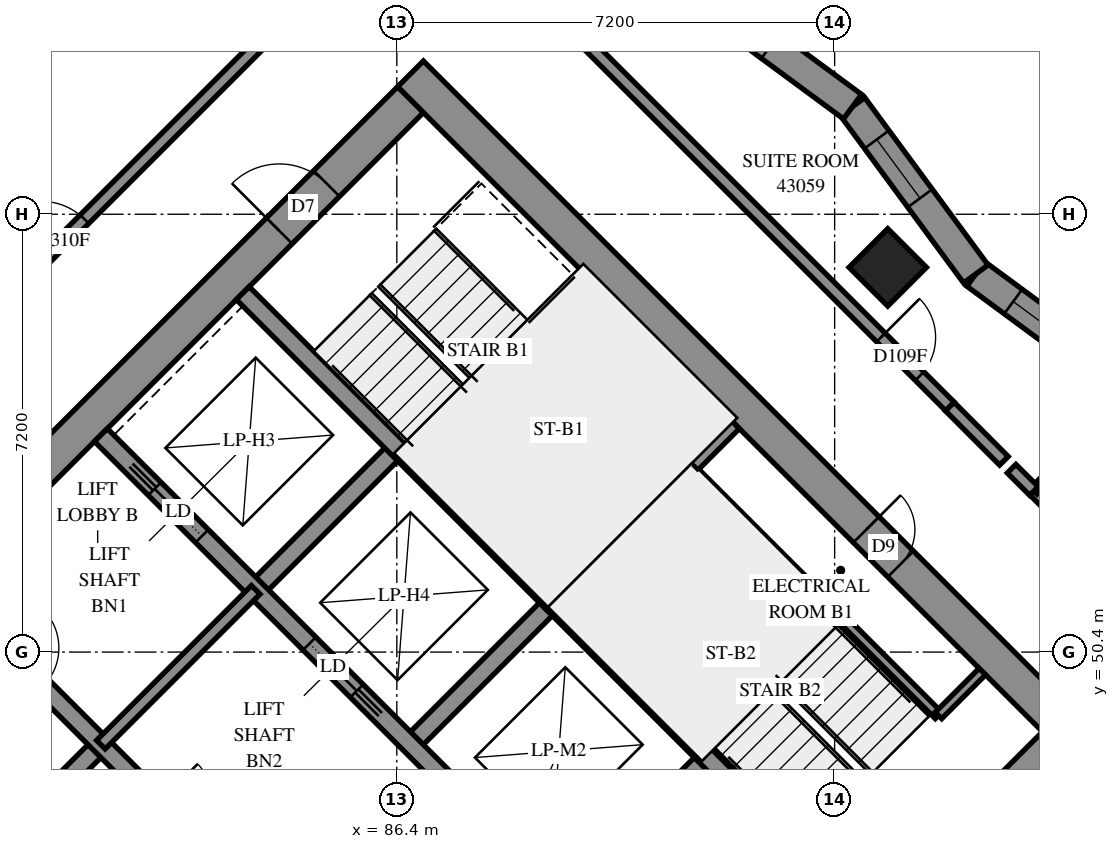
"""IFC4 building model, lengths in metres.
Left out: names, types, materials, properties, quantities, classifications, styles, units other than length and angle.
Written with IfcOpenShell. Run it as: python <this file> out.ifc"""

import sys

from ifc_helpers import new_model, si_unit, direction, frame, frame_2d, origin, origin_2d, place, context, subcontext, project, spatial, polyline, rectangle, outline, extrude, element, fill, save


model = new_model("IFC4")
c1 = context("Model", 3, precision=1e-05, world=origin(), true_north=direction((0.0, 1.0)))
c2 = subcontext(c1, "Body", "Model", "MODEL_VIEW")
j1 = project(units=[si_unit("LENGTHUNIT", "METRE"), si_unit("PLANEANGLEUNIT", "RADIAN")], contexts=[c1])
p1 = place(None, origin())
s1 = spatial("IfcSite", under=j1, at=p1, CompositionType="ELEMENT")
p2 = place(p1, origin())
s2 = spatial("IfcBuilding", under=s1, at=p2, CompositionType="ELEMENT")
p3 = place(p2, frame((0.0, 0.0, 159.2)))
s3 = spatial("IfcBuildingStorey", under=s2, at=p3, CompositionType="ELEMENT", Elevation=159.2)
p4 = place(p3, frame((94.474, 56.727, 0.0), z_axis=(0.0, 0.0, 1.0), x_axis=(0.7071067812, -0.7071067812, 0.0)))
e1 = element("IfcColumn", 1, at=p4, inside=s3, PredefinedType="COLUMN", context=c2, shape_type="SweptSolid", body=[
    extrude(rectangle(XDim=0.9, YDim=0.9, at=origin_2d()), origin(), (0.0, 0.0, 1.0), 3.1),
])
p5 = place(p3, frame((76.018, 49.302, -0.3), z_axis=(0.0, 0.0, 1.0), x_axis=(0.7071067812, -0.7071067812, 0.0)))
e2 = element("IfcWall", 2, at=p5, inside=s3, PredefinedType="SHEAR", context=c2, shape_type="SweptSolid", body=[
    extrude(rectangle(XDim=15.6, YDim=0.6, at=frame_2d((7.8, 0.0))), origin(), (0.0, 0.0, 1.0), 2.7),
])
p6 = place(p3, frame((86.625, 59.908, -0.3), z_axis=(0.0, 0.0, 1.0), x_axis=(0.7071067812, -0.7071067812, 0.0)))
e3 = element("IfcWall", 3, at=p6, inside=s3, PredefinedType="SHEAR", context=c2, shape_type="SweptSolid", body=[
    extrude(rectangle(XDim=15.6, YDim=0.6, at=frame_2d((7.8, 0.0))), origin(), (0.0, 0.0, 1.0), 2.7),
])
p7 = place(p6, frame((10.6, 0.0, 0.3)))
e4 = element("IfcOpeningElement", 4, at=p7, cuts=e3, PredefinedType="OPENING", context=c2, shape_type="SweptSolid", body=[
    extrude(rectangle(XDim=0.8, YDim=2.1, at=frame_2d((0.4, 1.05))), frame((0.0, 0.31, 0.0), z_axis=(0.0, -1.0, 0.0), x_axis=(1.0, 0.0, 0.0)), (0.0, 0.0, 1.0), 0.62),
])
p8 = place(p3, frame((76.442, 49.302, -0.3), z_axis=(0.0, 0.0, 1.0), x_axis=(0.7071067812, 0.7071067812, 0.0)))
e5 = element("IfcWall", 5, at=p8, inside=s3, PredefinedType="SHEAR", context=c2, shape_type="SweptSolid", body=[
    extrude(rectangle(XDim=14.4, YDim=0.6, at=frame_2d((7.2, 0.0))), origin(), (0.0, 0.0, 1.0), 2.7),
])
p9 = place(p8, frame((4.55, 0.0, 0.3)))
e6 = element("IfcOpeningElement", 6, at=p9, cuts=e5, PredefinedType="OPENING", context=c2, shape_type="SweptSolid", body=[
    extrude(rectangle(XDim=1.1, YDim=2.1, at=frame_2d((0.55, 1.05))), frame((0.0, 0.31, 0.0), z_axis=(0.0, -1.0, 0.0), x_axis=(1.0, 0.0, 0.0)), (0.0, 0.0, 1.0), 0.62),
])
p10 = place(p8, frame((11.35, 0.0, 0.3)))
e7 = element("IfcOpeningElement", 7, at=p10, cuts=e5, PredefinedType="OPENING", context=c2, shape_type="SweptSolid", body=[
    extrude(rectangle(XDim=1.1, YDim=2.1, at=frame_2d((0.55, 1.05))), frame((0.0, 0.31, 0.0), z_axis=(0.0, -1.0, 0.0), x_axis=(1.0, 0.0, 0.0)), (0.0, 0.0, 1.0), 0.62),
])
p11 = place(p3, frame((87.049, 38.695, -0.3), z_axis=(0.0, 0.0, 1.0), x_axis=(0.7071067812, 0.7071067812, 0.0)))
e8 = element("IfcWall", 8, at=p11, inside=s3, PredefinedType="SHEAR", context=c2, shape_type="SweptSolid", body=[
    extrude(rectangle(XDim=14.4, YDim=0.6, at=frame_2d((7.2, 0.0))), origin(), (0.0, 0.0, 1.0), 2.7),
])
p12 = place(p11, frame((4.55, 0.0, 0.3)))
e9 = element("IfcOpeningElement", 9, at=p12, cuts=e8, PredefinedType="OPENING", context=c2, shape_type="SweptSolid", body=[
    extrude(rectangle(XDim=1.1, YDim=2.1, at=frame_2d((0.55, 1.05))), frame((0.0, 0.31, 0.0), z_axis=(0.0, -1.0, 0.0), x_axis=(1.0, 0.0, 0.0)), (0.0, 0.0, 1.0), 0.62),
])
p13 = place(p11, frame((11.35, 0.0, 0.3)))
e10 = element("IfcOpeningElement", 10, at=p13, cuts=e8, PredefinedType="OPENING", context=c2, shape_type="SweptSolid", body=[
    extrude(rectangle(XDim=1.1, YDim=2.1, at=frame_2d((0.55, 1.05))), frame((0.0, 0.31, 0.0), z_axis=(0.0, -1.0, 0.0), x_axis=(1.0, 0.0, 0.0)), (0.0, 0.0, 1.0), 0.62),
])
for number, where, z_axis, x_axis in (
    (11, (79.2, 46.544, 0.0), (0.0, 0.0, 1.0), (0.707, 0.707, 0.0)),
    (12, (84.079, 51.423, 0.0), (0.0, 0.0, 1.0), (0.707, 0.707, 0.0)),
):
    element("IfcWall", number, at=place(p3, frame(where, z_axis=z_axis, x_axis=x_axis)), inside=s3, PredefinedType="SOLIDWALL", context=c2, shape_type="SweptSolid", body=[
        extrude(rectangle(XDim=3.3, YDim=0.3, at=frame_2d((1.65, 0.0))), origin(), (0.0, 0.0, 1.0), 3.1),
    ])
for number, where, z_axis, x_axis in (
    (13, (86.625, 48.878, 0.0), (0.0, 0.0, 1.0), (0.707, 0.707, 0.0)),
    (14, (89.17, 46.332, 0.0), (0.0, 0.0, 1.0), (0.707, 0.707, 0.0)),
):
    element("IfcWall", number, at=place(p3, frame(where, z_axis=z_axis, x_axis=x_axis)), inside=s3, PredefinedType="SOLIDWALL", context=c2, shape_type="SweptSolid", body=[
        extrude(rectangle(XDim=3.3, YDim=0.3, at=frame_2d((1.65, 0.0))), origin(), (0.0, 0.0, 1.0), 3.1),
    ])
p14 = place(p3, frame((78.988, 51.423, 0.0), z_axis=(0.0, 0.0, 1.0), x_axis=(0.7071067812, -0.7071067812, 0.0)))
e15 = element("IfcWall", 15, at=p14, inside=s3, PredefinedType="SOLIDWALL", context=c2, shape_type="SweptSolid", body=[
    extrude(rectangle(XDim=14.4, YDim=0.3, at=frame_2d((7.2, 0.0))), origin(), (0.0, 0.0, 1.0), 3.1),
])
p15 = place(p14, frame((1.35, 0.0, 0.0)))
e16 = element("IfcOpeningElement", 16, at=p15, cuts=e15, PredefinedType="OPENING", context=c2, shape_type="SweptSolid", body=[
    extrude(rectangle(XDim=0.9, YDim=2.1, at=frame_2d((0.45, 1.05))), frame((0.0, 0.16, 0.0), z_axis=(0.0, -1.0, 0.0), x_axis=(1.0, 0.0, 0.0)), (0.0, 0.0, 1.0), 0.32),
])
p16 = place(p14, frame((4.95, 0.0, 0.0)))
e17 = element("IfcOpeningElement", 17, at=p16, cuts=e15, PredefinedType="OPENING", context=c2, shape_type="SweptSolid", body=[
    extrude(rectangle(XDim=0.9, YDim=2.1, at=frame_2d((0.45, 1.05))), frame((0.0, 0.16, 0.0), z_axis=(0.0, -1.0, 0.0), x_axis=(1.0, 0.0, 0.0)), (0.0, 0.0, 1.0), 0.32),
])
p17 = place(p14, frame((8.55, 0.0, 0.0)))
e18 = element("IfcOpeningElement", 18, at=p17, cuts=e15, PredefinedType="OPENING", context=c2, shape_type="SweptSolid", body=[
    extrude(rectangle(XDim=0.9, YDim=2.1, at=frame_2d((0.45, 1.05))), frame((0.0, 0.16, 0.0), z_axis=(0.0, -1.0, 0.0), x_axis=(1.0, 0.0, 0.0)), (0.0, 0.0, 1.0), 0.32),
])
p18 = place(p14, frame((12.05, 0.0, 0.0)))
e19 = element("IfcOpeningElement", 19, at=p18, cuts=e15, PredefinedType="OPENING", context=c2, shape_type="SweptSolid", body=[
    extrude(rectangle(XDim=1.1, YDim=2.1, at=frame_2d((0.55, 1.05))), frame((0.0, 0.16, 0.0), z_axis=(0.0, -1.0, 0.0), x_axis=(1.0, 0.0, 0.0)), (0.0, 0.0, 1.0), 0.32),
])
p19 = place(p3, frame((81.534, 53.969, 0.0), z_axis=(0.0, 0.0, 1.0), x_axis=(0.707103309, -0.7071102534, 0.0)))
e20 = element("IfcWall", 20, at=p19, inside=s3, PredefinedType="SOLIDWALL", context=c2, shape_type="SweptSolid", body=[
    extrude(rectangle(XDim=14.4, YDim=0.3, at=frame_2d((7.2, 0.0))), origin(), (0.0, 0.0, 1.0), 3.1),
])
p20 = place(p19, frame((1.25, 0.0, 0.0)))
e21 = element("IfcOpeningElement", 21, at=p20, cuts=e20, PredefinedType="OPENING", context=c2, shape_type="SweptSolid", body=[
    extrude(rectangle(XDim=1.1, YDim=2.1, at=frame_2d((0.55, 1.05))), frame((0.0, 0.16, 0.0), z_axis=(0.0, -1.0, 0.0), x_axis=(1.0, 0.0, 0.0)), (0.0, 0.0, 1.0), 0.32),
])
p21 = place(p19, frame((4.85, 0.0, 0.0)))
e22 = element("IfcOpeningElement", 22, at=p21, cuts=e20, PredefinedType="OPENING", context=c2, shape_type="SweptSolid", body=[
    extrude(rectangle(XDim=1.1, YDim=2.1, at=frame_2d((0.55, 1.05))), frame((0.0, 0.16, 0.0), z_axis=(0.0, -1.0, 0.0), x_axis=(1.0, 0.0, 0.0)), (0.0, 0.0, 1.0), 0.32),
])
p22 = place(p19, frame((8.45, 0.0, 0.0)))
e23 = element("IfcOpeningElement", 23, at=p22, cuts=e20, PredefinedType="OPENING", context=c2, shape_type="SweptSolid", body=[
    extrude(rectangle(XDim=1.1, YDim=2.1, at=frame_2d((0.55, 1.05))), frame((0.0, 0.16, 0.0), z_axis=(0.0, -1.0, 0.0), x_axis=(1.0, 0.0, 0.0)), (0.0, 0.0, 1.0), 0.32),
])
p23 = place(p19, frame((12.05, 0.0, 0.0)))
e24 = element("IfcOpeningElement", 24, at=p23, cuts=e20, PredefinedType="OPENING", context=c2, shape_type="SweptSolid", body=[
    extrude(rectangle(XDim=1.1, YDim=2.1, at=frame_2d((0.55, 1.05))), frame((0.0, 0.16, 0.0), z_axis=(0.0, -1.0, 0.0), x_axis=(1.0, 0.0, 0.0)), (0.0, 0.0, 1.0), 0.32),
])
for number, where, z_axis, x_axis in (
    (25, (83.867, 56.302, 0.0), (0.0, 0.0, 1.0), (0.707, -0.707, 0.0)),
    (26, (88.958, 51.211, 0.0), (0.0, 0.0, 1.0), (0.707, -0.707, 0.0)),
):
    element("IfcWall", number, at=place(p3, frame(where, z_axis=z_axis, x_axis=x_axis)), inside=s3, PredefinedType="SOLIDWALL", context=c2, shape_type="SweptSolid", body=[
        extrude(rectangle(XDim=7.2, YDim=0.3, at=frame_2d((3.6, 0.0))), origin(), (0.0, 0.0, 1.0), 3.1),
    ])
p24 = place(p3, frame((88.958, 51.211, 0.0), z_axis=(0.0, 0.0, 1.0), x_axis=(0.7071067812, 0.7071067812, 0.0)))
e27 = element("IfcWall", 27, at=p24, inside=s3, PredefinedType="SOLIDWALL", context=c2, shape_type="SweptSolid", body=[
    extrude(rectangle(XDim=4.2, YDim=0.3, at=frame_2d((2.1, 0.0))), origin(), (0.0, 0.0, 1.0), 3.1),
])
p25 = place(p3, frame((98.674, 54.59, 0.0), z_axis=(0.0, 0.0, 1.0), x_axis=(-0.8050440725, 0.5932150043, 0.0)))
e28 = element("IfcWall", 28, at=p25, inside=s3, PredefinedType="SOLIDWALL", context=c2, shape_type="SweptSolid", body=[
    extrude(outline(polyline([(-0.038, -0.25), (3.381, -0.25), (3.456, 0.25), (0.038, 0.25), (-0.038, -0.25)])), origin(), (0.0, 0.0, 1.0), 3.1),
])
p26 = place(p25, frame((1.455, 0.0, 0.45)))
e29 = element("IfcOpeningElement", 29, at=p26, cuts=e28, PredefinedType="OPENING", context=c2, shape_type="SweptSolid", body=[
    extrude(rectangle(XDim=1.2, YDim=2.5, at=frame_2d((0.6, 1.25))), frame((0.0, 0.26, 0.0), z_axis=(0.0, -1.0, 0.0), x_axis=(1.0, 0.0, 0.0)), (0.0, 0.0, 1.0), 0.52),
])
p27 = place(p3, frame((95.922, 56.618, 0.0), z_axis=(0.0, 0.0, 1.0), x_axis=(-0.5932150043, 0.8050440725, 0.0)))
e30 = element("IfcWall", 30, at=p27, inside=s3, PredefinedType="SOLIDWALL", context=c2, shape_type="SweptSolid", body=[
    extrude(outline(polyline([(0.038, -0.25), (3.456, -0.25), (3.381, 0.25), (-0.038, 0.25), (0.038, -0.25)])), origin(), (0.0, 0.0, 1.0), 3.1),
])
p28 = place(p27, frame((1.547, 0.0, 0.45)))
e31 = element("IfcOpeningElement", 31, at=p28, cuts=e30, PredefinedType="OPENING", context=c2, shape_type="SweptSolid", body=[
    extrude(rectangle(XDim=1.2, YDim=2.5, at=frame_2d((0.6, 1.25))), frame((0.0, 0.26, 0.0), z_axis=(0.0, -1.0, 0.0), x_axis=(1.0, 0.0, 0.0)), (0.0, 0.0, 1.0), 0.52),
])
p29 = place(p3, frame((93.894, 59.37, 0.0), z_axis=(0.0, 0.0, 1.0), x_axis=(-0.8050403966, 0.5932199928, 0.0)))
e32 = element("IfcWall", 32, at=p29, inside=s3, PredefinedType="SOLIDWALL", context=c2, shape_type="SweptSolid", body=[
    extrude(outline(polyline([(-0.038, -0.25), (3.381, -0.25), (3.456, 0.25), (0.038, 0.25), (-0.038, -0.25)])), origin(), (0.0, 0.0, 1.0), 3.1),
])
p30 = place(p29, frame((1.677, 0.0, 0.45)))
e33 = element("IfcOpeningElement", 33, at=p30, cuts=e32, PredefinedType="OPENING", context=c2, shape_type="SweptSolid", body=[
    extrude(rectangle(XDim=1.2, YDim=2.5, at=frame_2d((0.6, 1.25))), frame((0.0, 0.26, 0.0), z_axis=(0.0, -1.0, 0.0), x_axis=(1.0, 0.0, 0.0)), (0.0, 0.0, 1.0), 0.52),
])
p31 = place(p3, frame((91.313, 53.354, 0.0), z_axis=(0.0, 0.0, 1.0), x_axis=(0.7071067812, -0.7071067812, 0.0)))
e34 = element("IfcWall", 34, at=p31, inside=s3, PredefinedType="PARTITIONING", context=c2, shape_type="SweptSolid", body=[
    extrude(rectangle(XDim=5.65, YDim=0.15, at=frame_2d((2.825, 0.0))), origin(), (0.0, 0.0, 1.0), 3.1),
])
p32 = place(p3, frame((95.308, 49.358, 0.0), z_axis=(0.0, 0.0, 1.0), x_axis=(0.70705776, 0.707155799, 0.0)))
e35 = element("IfcWall", 35, at=p32, inside=s3, PredefinedType="PARTITIONING", context=c2, shape_type="SweptSolid", body=[
    extrude(rectangle(XDim=1.02, YDim=0.15, at=frame_2d((0.51, 0.0))), origin(), (0.0, 0.0, 1.0), 3.1),
])
p33 = place(p3, frame((81.534, 48.878, 0.0), z_axis=(0.0, 0.0, 1.0), x_axis=(0.707092892, 0.7071206701, 0.0)))
e36 = element("IfcWall", 36, at=p33, inside=s3, PredefinedType="PARTITIONING", context=c2, shape_type="SweptSolid", body=[
    extrude(rectangle(XDim=3.6, YDim=0.2, at=frame_2d((1.8, 0.0))), origin(), (0.0, 0.0, 1.0), 3.1),
])
p34 = place(p3, frame((86.841, 63.093, 0.0), z_axis=(0.0, 0.0, 1.0), x_axis=(0.7071067812, -0.7071067812, 0.0)))
e37 = element("IfcWall", 37, at=p34, inside=s3, PredefinedType="PARTITIONING", context=c2, shape_type="SweptSolid", body=[
    extrude(rectangle(XDim=12.239, YDim=0.2, at=frame_2d((6.119, 0.0))), origin(), (0.0, 0.0, 1.0), 3.1),
])
p35 = place(p34, frame((10.634, 0.0, 0.0)))
e38 = element("IfcOpeningElement", 38, at=p35, cuts=e37, PredefinedType="OPENING", context=c2, shape_type="SweptSolid", body=[
    extrude(rectangle(XDim=0.9, YDim=2.1, at=frame_2d((0.45, 1.05))), frame((0.0, 0.11, 0.0), z_axis=(0.0, -1.0, 0.0), x_axis=(1.0, 0.0, 0.0)), (0.0, 0.0, 1.0), 0.22),
])
p36 = place(p3, frame((94.401, 41.383, 0.0), z_axis=(0.0, 0.0, 1.0), x_axis=(0.7071067812, 0.7071067812, 0.0)))
e39 = element("IfcWall", 39, at=p36, inside=s3, PredefinedType="PARTITIONING", context=c2, shape_type="SweptSolid", body=[
    extrude(rectangle(XDim=12.04, YDim=0.2, at=frame_2d((6.02, 0.0))), origin(), (0.0, 0.0, 1.0), 3.1),
])
p37 = place(p3, frame((93.767, 42.021, 0.0), z_axis=(0.0, 0.0, 1.0), x_axis=(0.7071067812, 0.7071067812, 0.0)))
e40 = element("IfcWall", 40, at=p37, inside=s3, PredefinedType="PARTITIONING", context=c2, shape_type="SweptSolid", body=[
    extrude(rectangle(XDim=9.998, YDim=0.2, at=frame_2d((4.999, 0.0))), origin(), (0.0, 0.0, 1.0), 3.1),
])
p38 = place(p37, frame((0.196, 0.0, 0.0)))
e41 = element("IfcOpeningElement", 41, at=p38, cuts=e40, PredefinedType="OPENING", context=c2, shape_type="SweptSolid", body=[
    extrude(rectangle(XDim=1.0, YDim=2.1, at=frame_2d((0.5, 1.05))), frame((0.0, 0.11, 0.0), z_axis=(0.0, -1.0, 0.0), x_axis=(1.0, 0.0, 0.0)), (0.0, 0.0, 1.0), 0.22),
])
p39 = place(p3, frame((79.799, 56.055, 0.0), z_axis=(0.0, 0.0, 1.0), x_axis=(0.7071067812, 0.7071067812, 0.0)))
e42 = element("IfcWall", 42, at=p39, inside=s3, PredefinedType="PARTITIONING", context=c2, shape_type="SweptSolid", body=[
    extrude(rectangle(XDim=9.95, YDim=0.2, at=frame_2d((4.975, 0.0))), origin(), (0.0, 0.0, 1.0), 3.1),
])
p40 = place(p39, frame((1.071, 0.0, 0.0)))
e43 = element("IfcOpeningElement", 43, at=p40, cuts=e42, PredefinedType="OPENING", context=c2, shape_type="SweptSolid", body=[
    extrude(rectangle(XDim=1.0, YDim=2.1, at=frame_2d((0.5, 1.05))), frame((0.0, 0.11, 0.0), z_axis=(0.0, -1.0, 0.0), x_axis=(1.0, 0.0, 0.0)), (0.0, 0.0, 1.0), 0.22),
])
p41 = place(p3, frame((96.882, 53.053, 0.0), z_axis=(0.0, 0.0, 1.0), x_axis=(0.7071067812, -0.7071067812, 0.0)))
e44 = element("IfcWall", 44, at=p41, inside=s3, PredefinedType="PARTITIONING", context=c2, shape_type="SweptSolid", body=[
    extrude(rectangle(XDim=2.86, YDim=0.2, at=frame_2d((1.43, 0.0))), origin(), (0.0, 0.0, 1.0), 3.1),
])
p42 = place(p3, frame((96.877, 53.051, 0.0), z_axis=(0.0, 0.0, 1.0), x_axis=(0.7071067812, 0.7071067812, 0.0)))
e45 = element("IfcWall", 45, at=p42, inside=s3, PredefinedType="PARTITIONING", context=c2, shape_type="SweptSolid", body=[
    extrude(rectangle(XDim=2.078, YDim=0.15, at=frame_2d((1.039, 0.0))), origin(), (0.0, 0.0, 1.0), 3.1),
])
p43 = place(p42, frame((0.969, 0.0, 0.0)))
e46 = element("IfcOpeningElement", 46, at=p43, cuts=e45, PredefinedType="OPENING", context=c2, shape_type="SweptSolid", body=[
    extrude(rectangle(XDim=0.8, YDim=2.1, at=frame_2d((0.4, 1.05))), frame((0.0, 0.085, 0.0), z_axis=(0.0, -1.0, 0.0), x_axis=(1.0, 0.0, 0.0)), (0.0, 0.0, 1.0), 0.17),
])
p44 = place(p3, frame((95.494, 54.438, 0.0), z_axis=(0.0, 0.0, 1.0), x_axis=(0.706312726, -0.7078999456, 0.0)))
e47 = element("IfcWall", 47, at=p44, inside=s3, PredefinedType="PARTITIONING", context=c2, shape_type="SweptSolid", body=[
    extrude(rectangle(XDim=1.26, YDim=0.2, at=frame_2d((0.63, 0.0))), origin(), (0.0, 0.0, 1.0), 3.1),
])
p45 = place(p3, frame((96.51, 53.416, 0.0), z_axis=(0.0, 0.0, 1.0), x_axis=(0.7090308706, -0.7051774419, 0.0)))
e48 = element("IfcWall", 48, at=p45, inside=s3, PredefinedType="PARTITIONING", context=c2, shape_type="SweptSolid", body=[
    extrude(rectangle(XDim=0.519, YDim=0.2, at=frame_2d((0.26, 0.0))), origin(), (0.0, 0.0, 1.0), 3.1),
])
p46 = place(p26, origin())
e49 = element("IfcWindow", 49, at=p46, inside=s3, PartitioningType="SINGLE_PANEL", PredefinedType="WINDOW", context=c2, shape_type="SweptSolid", body=[
    extrude(rectangle(XDim=1.2, YDim=2.5, at=frame_2d((0.6, 1.25))), frame((0.0, 0.18, 0.0), z_axis=(0.0, -1.0, 0.0), x_axis=(1.0, 0.0, 0.0)), (0.0, 0.0, 1.0), 0.06),
])
fill(e29, e49)
p47 = place(p28, origin())
e50 = element("IfcWindow", 50, at=p47, inside=s3, PartitioningType="SINGLE_PANEL", PredefinedType="WINDOW", context=c2, shape_type="SweptSolid", body=[
    extrude(rectangle(XDim=1.2, YDim=2.5, at=frame_2d((0.6, 1.25))), frame((0.0, 0.18, 0.0), z_axis=(0.0, -1.0, 0.0), x_axis=(1.0, 0.0, 0.0)), (0.0, 0.0, 1.0), 0.06),
])
fill(e31, e50)
p48 = place(p30, origin())
e51 = element("IfcWindow", 51, at=p48, inside=s3, PartitioningType="SINGLE_PANEL", PredefinedType="WINDOW", context=c2, shape_type="SweptSolid", body=[
    extrude(rectangle(XDim=1.2, YDim=2.5, at=frame_2d((0.6, 1.25))), frame((0.0, 0.18, 0.0), z_axis=(0.0, -1.0, 0.0), x_axis=(1.0, 0.0, 0.0)), (0.0, 0.0, 1.0), 0.06),
])
fill(e33, e51)
p49 = place(p7, origin())
e52 = element("IfcDoor", 52, at=p49, inside=s3, OperationType="SINGLE_SWING_RIGHT", PredefinedType="DOOR", context=c2, shape_type="SweptSolid", body=[
    extrude(rectangle(XDim=0.8, YDim=2.1, at=frame_2d((0.4, 1.05))), frame((0.0, 0.025, 0.0), z_axis=(0.0, -1.0, 0.0), x_axis=(1.0, 0.0, 0.0)), (0.0, 0.0, 1.0), 0.05),
])
fill(e4, e52)
p50 = place(p10, origin())
e53 = element("IfcDoor", 53, at=p50, inside=s3, OperationType="SINGLE_SWING_LEFT", PredefinedType="DOOR", context=c2, shape_type="SweptSolid", body=[
    extrude(rectangle(XDim=1.1, YDim=2.1, at=frame_2d((0.55, 1.05))), frame((0.0, 0.025, 0.0), z_axis=(0.0, -1.0, 0.0), x_axis=(1.0, 0.0, 0.0)), (0.0, 0.0, 1.0), 0.05),
])
fill(e7, e53)
p51 = place(p20, origin())
e54 = element("IfcDoor", 54, at=p51, inside=s3, OperationType="SLIDING_TO_LEFT", PredefinedType="DOOR", context=c2, shape_type="SweptSolid", body=[
    extrude(rectangle(XDim=1.1, YDim=2.1, at=frame_2d((0.55, 1.05))), frame((0.0, 0.025, 0.0), z_axis=(0.0, -1.0, 0.0), x_axis=(1.0, 0.0, 0.0)), (0.0, 0.0, 1.0), 0.05),
])
fill(e21, e54)
p52 = place(p21, origin())
e55 = element("IfcDoor", 55, at=p52, inside=s3, OperationType="SLIDING_TO_RIGHT", PredefinedType="DOOR", context=c2, shape_type="SweptSolid", body=[
    extrude(rectangle(XDim=1.1, YDim=2.1, at=frame_2d((0.55, 1.05))), frame((0.0, 0.025, 0.0), z_axis=(0.0, -1.0, 0.0), x_axis=(1.0, 0.0, 0.0)), (0.0, 0.0, 1.0), 0.05),
])
fill(e22, e55)
p53 = place(p40, origin())
e56 = element("IfcDoor", 56, at=p53, inside=s3, OperationType="SINGLE_SWING_RIGHT", PredefinedType="DOOR", context=c2, shape_type="SweptSolid", body=[
    extrude(rectangle(XDim=1.0, YDim=2.1, at=frame_2d((0.5, 1.05))), frame((0.0, 0.025, 0.0), z_axis=(0.0, -1.0, 0.0), x_axis=(1.0, 0.0, 0.0)), (0.0, 0.0, 1.0), 0.05),
])
fill(e43, e56)
p54 = place(p35, origin())
e57 = element("IfcDoor", 57, at=p54, inside=s3, OperationType="SINGLE_SWING_LEFT", PredefinedType="DOOR", context=c2, shape_type="SweptSolid", body=[
    extrude(rectangle(XDim=0.9, YDim=2.1, at=frame_2d((0.45, 1.05))), frame((0.0, 0.025, 0.0), z_axis=(0.0, -1.0, 0.0), x_axis=(1.0, 0.0, 0.0)), (0.0, 0.0, 1.0), 0.05),
])
fill(e38, e57)
save(model, sys.argv[1])
